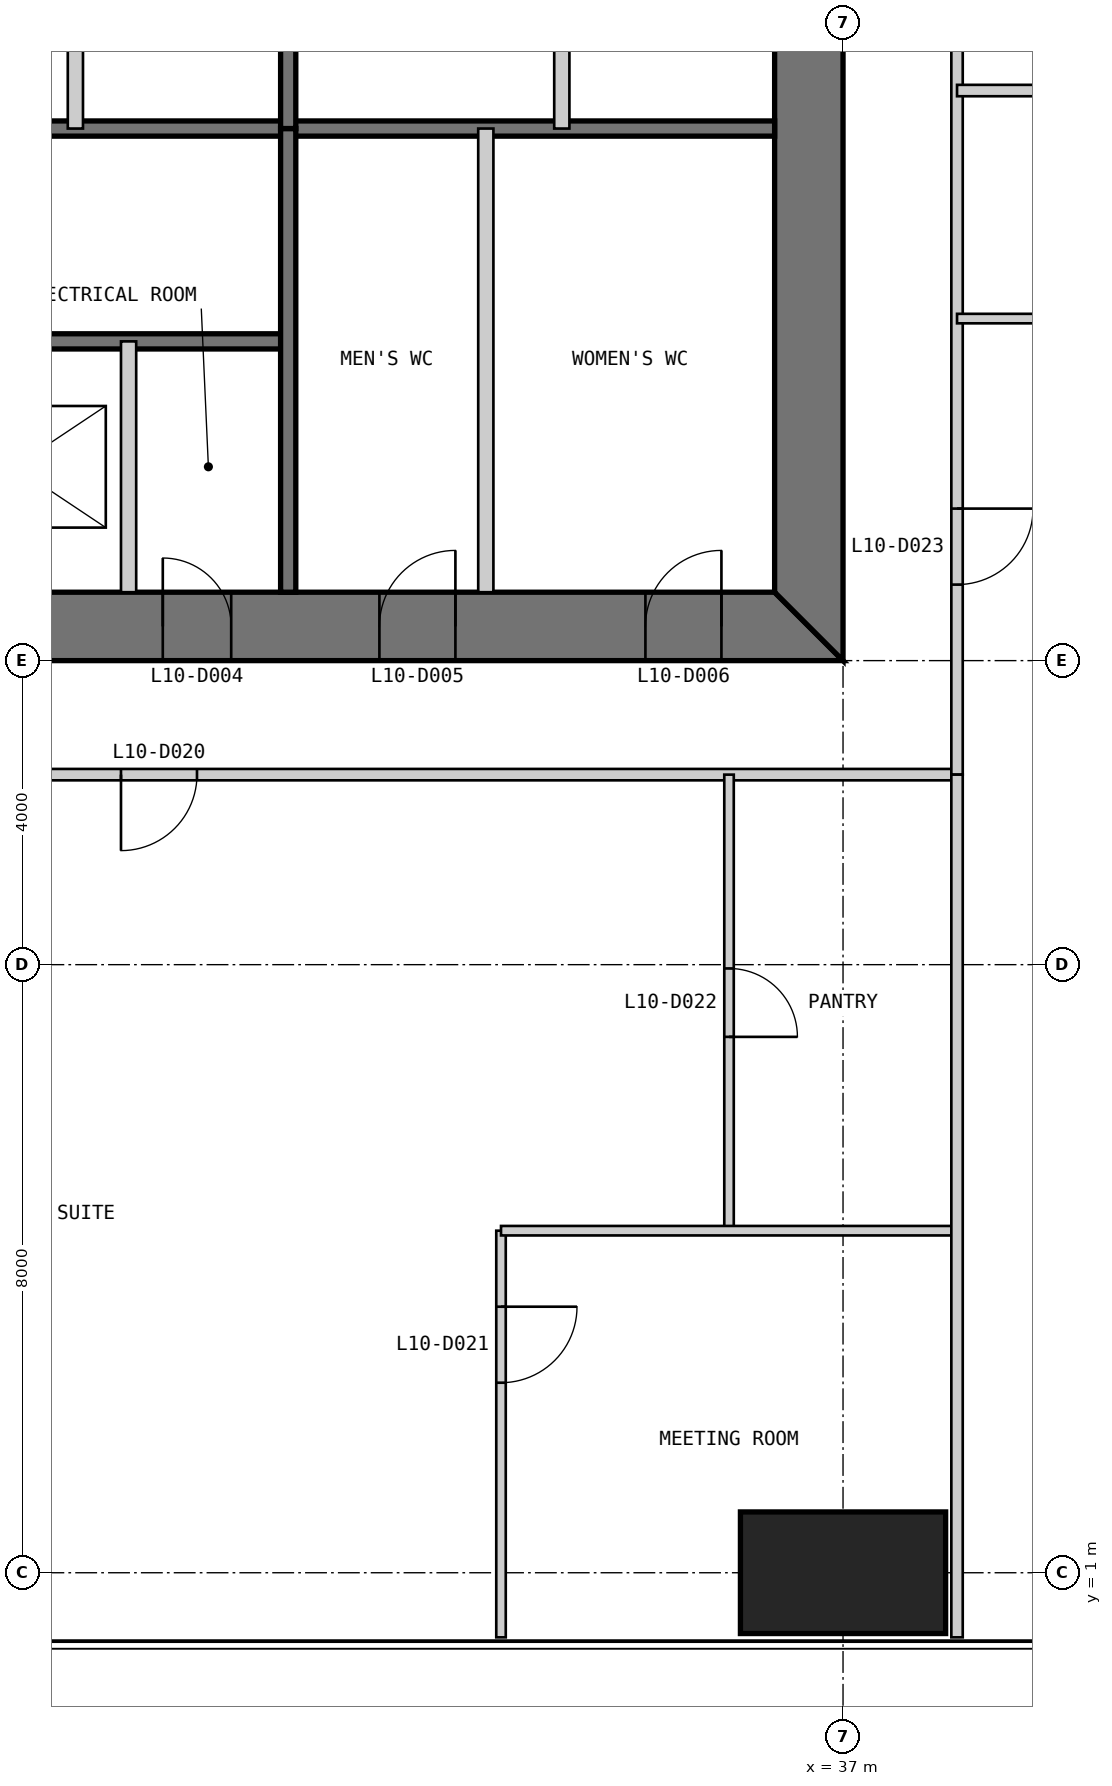
"""IFC4 building model, lengths in metres.
Left out: names, types, materials, properties, quantities, classifications, styles, units other than length and angle.
Written with IfcOpenShell. Run it as: python <this file> out.ifc"""

import sys

from ifc_helpers import new_model, si_unit, direction, frame, frame_2d, origin, origin_2d, place, context, subcontext, project, spatial, polyline, rectangle, outline, extrude, element, fill, save


model = new_model("IFC4")
c1 = context("Model", 3, precision=1e-05, world=origin(), true_north=direction((0.0, 1.0)))
c2 = subcontext(c1, "Body", "Model", "MODEL_VIEW")
j1 = project(units=[si_unit("LENGTHUNIT", "METRE"), si_unit("PLANEANGLEUNIT", "RADIAN")], contexts=[c1])
p1 = place(None, origin())
s1 = spatial("IfcSite", under=j1, at=p1, CompositionType="ELEMENT")
p2 = place(p1, origin())
s2 = spatial("IfcBuilding", under=s1, at=p2, CompositionType="ELEMENT")
p3 = place(p2, frame((0.0, 0.0, 47.0)))
s3 = spatial("IfcBuildingStorey", under=s2, at=p3, CompositionType="ELEMENT", Elevation=47.0)
p4 = place(p3, frame((37.0, 1.0, 0.0), z_axis=(0.0, 0.0, 1.0), x_axis=(1.0, 0.0, 0.0)))
e1 = element("IfcColumn", 1, at=p4, inside=s3, PredefinedType="COLUMN", context=c2, shape_type="SweptSolid", body=[
    extrude(rectangle(XDim=2.7, YDim=1.6, at=origin_2d()), origin(), (0.0, 0.0, 1.0), 4.0),
])
p5 = place(p3, frame((13.0, 13.45, 0.0), z_axis=(0.0, 0.0, 1.0), x_axis=(1.0, 0.0, 0.0)))
e2 = element("IfcWall", 2, at=p5, inside=s3, PredefinedType="SHEAR", context=c2, shape_type="SweptSolid", body=[
    extrude(outline(polyline([(0.0, -0.45), (24.0, -0.45), (23.1, 0.45), (0.9, 0.45), (0.0, -0.45)])), origin(), (0.0, 0.0, 1.0), 4.0),
])
p6 = place(p5, frame((4.9, 0.0, 0.0)))
e3 = element("IfcOpeningElement", 3, at=p6, cuts=e2, PredefinedType="OPENING", context=c2, shape_type="SweptSolid", body=[
    extrude(rectangle(XDim=1.0, YDim=2.2, at=frame_2d((0.5, 1.1))), frame((0.0, 0.46, 0.0), z_axis=(0.0, -1.0, 0.0), x_axis=(1.0, 0.0, 0.0)), (0.0, 0.0, 1.0), 0.92),
])
p7 = place(p5, frame((8.9, 0.0, 0.0)))
e4 = element("IfcOpeningElement", 4, at=p7, cuts=e2, PredefinedType="OPENING", context=c2, shape_type="SweptSolid", body=[
    extrude(rectangle(XDim=1.1, YDim=2.2, at=frame_2d((0.55, 1.1))), frame((0.0, 0.46, 0.0), z_axis=(0.0, -1.0, 0.0), x_axis=(1.0, 0.0, 0.0)), (0.0, 0.0, 1.0), 0.92),
])
p8 = place(p5, frame((15.05, 0.0, 0.0)))
e5 = element("IfcOpeningElement", 5, at=p8, cuts=e2, PredefinedType="OPENING", context=c2, shape_type="SweptSolid", body=[
    extrude(rectangle(XDim=0.9, YDim=2.2, at=frame_2d((0.45, 1.1))), frame((0.0, 0.46, 0.0), z_axis=(0.0, -1.0, 0.0), x_axis=(1.0, 0.0, 0.0)), (0.0, 0.0, 1.0), 0.92),
])
p9 = place(p5, frame((17.9, 0.0, 0.0)))
e6 = element("IfcOpeningElement", 6, at=p9, cuts=e2, PredefinedType="OPENING", context=c2, shape_type="SweptSolid", body=[
    extrude(rectangle(XDim=1.0, YDim=2.2, at=frame_2d((0.5, 1.1))), frame((0.0, 0.46, 0.0), z_axis=(0.0, -1.0, 0.0), x_axis=(1.0, 0.0, 0.0)), (0.0, 0.0, 1.0), 0.92),
])
p10 = place(p5, frame((21.4, 0.0, 0.0)))
e7 = element("IfcOpeningElement", 7, at=p10, cuts=e2, PredefinedType="OPENING", context=c2, shape_type="SweptSolid", body=[
    extrude(rectangle(XDim=1.0, YDim=2.2, at=frame_2d((0.5, 1.1))), frame((0.0, 0.46, 0.0), z_axis=(0.0, -1.0, 0.0), x_axis=(1.0, 0.0, 0.0)), (0.0, 0.0, 1.0), 0.92),
])
p11 = place(p3, frame((36.55, 13.9, 0.0), z_axis=(0.0, 0.0, 1.0), x_axis=(0.0, 1.0, 0.0)))
e8 = element("IfcWall", 8, at=p11, inside=s3, PredefinedType="SHEAR", context=c2, shape_type="SweptSolid", body=[
    extrude(outline(polyline([(-0.9, -0.45), (23.1, -0.45), (22.2, 0.45), (0.0, 0.45), (-0.9, -0.45)])), origin(), (0.0, 0.0, 1.0), 4.0),
])
p12 = place(p11, frame((20.2, 0.0, 0.0)))
e9 = element("IfcOpeningElement", 9, at=p12, cuts=e8, PredefinedType="OPENING", context=c2, shape_type="SweptSolid", body=[
    extrude(rectangle(XDim=1.0, YDim=2.2, at=frame_2d((0.5, 1.1))), frame((0.0, 0.46, 0.0), z_axis=(0.0, -1.0, 0.0), x_axis=(1.0, 0.0, 0.0)), (0.0, 0.0, 1.0), 0.92),
])
p13 = place(p11, frame((17.25, 0.0, 0.0)))
e10 = element("IfcOpeningElement", 10, at=p13, cuts=e8, PredefinedType="OPENING", context=c2, shape_type="SweptSolid", body=[
    extrude(rectangle(XDim=0.9, YDim=2.2, at=frame_2d((0.45, 1.1))), frame((0.0, 0.46, 0.0), z_axis=(0.0, -1.0, 0.0), x_axis=(1.0, 0.0, 0.0)), (0.0, 0.0, 1.0), 0.92),
])
p14 = place(p3, frame((20.3, 17.2, 0.0), z_axis=(0.0, 0.0, 1.0), x_axis=(1.0, 0.0, 0.0)))
e11 = element("IfcWall", 11, at=p14, inside=s3, PredefinedType="SOLIDWALL", context=c2, shape_type="SweptSolid", body=[
    extrude(rectangle(XDim=9.4, YDim=0.2, at=frame_2d((4.7, 0.0))), origin(), (0.0, 0.0, 1.0), 3.8),
])
p15 = place(p14, frame((0.25, 0.0, 0.0)))
e12 = element("IfcOpeningElement", 12, at=p15, cuts=e11, PredefinedType="OPENING", context=c2, shape_type="SweptSolid", body=[
    extrude(rectangle(XDim=1.0, YDim=2.2, at=frame_2d((0.5, 1.1))), frame((0.0, 0.11, 0.0), z_axis=(0.0, -1.0, 0.0), x_axis=(1.0, 0.0, 0.0)), (0.0, 0.0, 1.0), 0.22),
])
p16 = place(p3, frame((20.3, 20.0, 0.0), z_axis=(0.0, 0.0, 1.0), x_axis=(1.0, 0.0, 0.0)))
e13 = element("IfcWall", 13, at=p16, inside=s3, PredefinedType="SOLIDWALL", context=c2, shape_type="SweptSolid", body=[
    extrude(rectangle(XDim=15.8, YDim=0.2, at=frame_2d((7.9, 0.0))), origin(), (0.0, 0.0, 1.0), 3.8),
])
p17 = place(p3, frame((27.6, 13.9, 0.0), z_axis=(0.0, 0.0, 1.0), x_axis=(0.0, 1.0, 0.0)))
e14 = element("IfcWall", 14, at=p17, inside=s3, PredefinedType="PARTITIONING", context=c2, shape_type="SweptSolid", body=[
    extrude(rectangle(XDim=3.3, YDim=0.2, at=frame_2d((1.65, 0.0))), origin(), (0.0, 0.0, 1.0), 3.8),
])
p18 = place(p3, frame((29.7, 13.9, 0.0), z_axis=(0.0, 0.0, 1.0), x_axis=(0.0, 1.0, 0.0)))
e15 = element("IfcWall", 15, at=p18, inside=s3, PredefinedType="SOLIDWALL", context=c2, shape_type="SweptSolid", body=[
    extrude(rectangle(XDim=6.1, YDim=0.2, at=frame_2d((3.05, 0.0))), origin(), (0.0, 0.0, 1.0), 3.8),
])
p19 = place(p3, frame((32.3, 13.9, 0.0), z_axis=(0.0, 0.0, 1.0), x_axis=(0.0, 1.0, 0.0)))
e16 = element("IfcWall", 16, at=p19, inside=s3, PredefinedType="PARTITIONING", context=c2, shape_type="SweptSolid", body=[
    extrude(rectangle(XDim=6.1, YDim=0.2, at=frame_2d((3.05, 0.0))), origin(), (0.0, 0.0, 1.0), 3.8),
])
p20 = place(p3, frame((33.3, 36.1, 0.0), z_axis=(0.0, 0.0, 1.0), x_axis=(0.0, -1.0, 0.0)))
e17 = element("IfcWall", 17, at=p20, inside=s3, PredefinedType="PARTITIONING", context=c2, shape_type="SweptSolid", body=[
    extrude(rectangle(XDim=16.1, YDim=0.2, at=frame_2d((8.05, 0.0))), origin(), (0.0, 0.0, 1.0), 3.8),
])
p21 = place(p3, frame((29.7, 36.1, 0.0), z_axis=(0.0, 0.0, 1.0), x_axis=(0.0, -1.0, 0.0)))
e18 = element("IfcWall", 18, at=p21, inside=s3, PredefinedType="SOLIDWALL", context=c2, shape_type="SweptSolid", body=[
    extrude(rectangle(XDim=16.1, YDim=0.2, at=frame_2d((8.05, 0.0))), origin(), (0.0, 0.0, 1.0), 3.8),
])
p22 = place(p3, frame((26.9, 30.0, 0.0), z_axis=(0.0, 0.0, 1.0), x_axis=(0.0, -1.0, 0.0)))
e19 = element("IfcWall", 19, at=p22, inside=s3, PredefinedType="PARTITIONING", context=c2, shape_type="SweptSolid", body=[
    extrude(rectangle(XDim=10.0, YDim=0.2, at=frame_2d((5.0, 0.0))), origin(), (0.0, 0.0, 1.0), 3.8),
])
p23 = place(p3, frame((11.5, 11.5, 0.0), z_axis=(0.0, 0.0, 1.0), x_axis=(1.0, 0.0, 0.0)))
e20 = element("IfcWall", 20, at=p23, inside=s3, PredefinedType="PARTITIONING", context=c2, shape_type="SweptSolid", body=[
    extrude(rectangle(XDim=27.0, YDim=0.15, at=frame_2d((13.5, 0.0))), origin(), (0.0, 0.0, 1.0), 3.85),
])
p24 = place(p23, frame((2.5, 0.0, 0.0)))
e21 = element("IfcOpeningElement", 21, at=p24, cuts=e20, PredefinedType="OPENING", context=c2, shape_type="SweptSolid", body=[
    extrude(rectangle(XDim=1.0, YDim=2.2, at=frame_2d((0.5, 1.1))), frame((0.0, 0.085, 0.0), z_axis=(0.0, -1.0, 0.0), x_axis=(1.0, 0.0, 0.0)), (0.0, 0.0, 1.0), 0.17),
])
p25 = place(p23, frame((16.0, 0.0, 0.0)))
e22 = element("IfcOpeningElement", 22, at=p25, cuts=e20, PredefinedType="OPENING", context=c2, shape_type="SweptSolid", body=[
    extrude(rectangle(XDim=1.0, YDim=2.2, at=frame_2d((0.5, 1.1))), frame((0.0, 0.085, 0.0), z_axis=(0.0, -1.0, 0.0), x_axis=(1.0, 0.0, 0.0)), (0.0, 0.0, 1.0), 0.17),
])
p26 = place(p3, frame((32.5, 0.15, 0.0), z_axis=(0.0, 0.0, 1.0), x_axis=(0.0, 1.0, 0.0)))
e23 = element("IfcWall", 23, at=p26, inside=s3, PredefinedType="PARTITIONING", context=c2, shape_type="SweptSolid", body=[
    extrude(rectangle(XDim=5.35, YDim=0.125, at=frame_2d((2.675, 0.0))), origin(), (0.0, 0.0, 1.0), 3.85),
])
p27 = place(p26, frame((3.35, 0.0, 0.0)))
e24 = element("IfcOpeningElement", 24, at=p27, cuts=e23, PredefinedType="OPENING", context=c2, shape_type="SweptSolid", body=[
    extrude(rectangle(XDim=1.0, YDim=2.2, at=frame_2d((0.5, 1.1))), frame((0.0, 0.073, 0.0), z_axis=(0.0, -1.0, 0.0), x_axis=(1.0, 0.0, 0.0)), (0.0, 0.0, 1.0), 0.145),
])
p28 = place(p3, frame((35.5, 5.5, 0.0), z_axis=(0.0, 0.0, 1.0), x_axis=(0.0, 1.0, 0.0)))
e25 = element("IfcWall", 25, at=p28, inside=s3, PredefinedType="PARTITIONING", context=c2, shape_type="SweptSolid", body=[
    extrude(rectangle(XDim=6.0, YDim=0.125, at=frame_2d((3.0, 0.0))), origin(), (0.0, 0.0, 1.0), 3.85),
])
p29 = place(p28, frame((2.55, 0.0, 0.0)))
e26 = element("IfcOpeningElement", 26, at=p29, cuts=e25, PredefinedType="OPENING", context=c2, shape_type="SweptSolid", body=[
    extrude(rectangle(XDim=0.9, YDim=2.2, at=frame_2d((0.45, 1.1))), frame((0.0, 0.073, 0.0), z_axis=(0.0, -1.0, 0.0), x_axis=(1.0, 0.0, 0.0)), (0.0, 0.0, 1.0), 0.145),
])
p30 = place(p3, frame((32.5, 5.5, 0.0), z_axis=(0.0, 0.0, 1.0), x_axis=(1.0, 0.0, 0.0)))
e27 = element("IfcWall", 27, at=p30, inside=s3, PredefinedType="PARTITIONING", context=c2, shape_type="SweptSolid", body=[
    extrude(rectangle(XDim=6.0, YDim=0.125, at=frame_2d((3.0, 0.0))), origin(), (0.0, 0.0, 1.0), 3.85),
])
p31 = place(p3, frame((38.5, 11.5, 0.0), z_axis=(0.0, 0.0, 1.0), x_axis=(0.0, 1.0, 0.0)))
e28 = element("IfcWall", 28, at=p31, inside=s3, PredefinedType="PARTITIONING", context=c2, shape_type="SweptSolid", body=[
    extrude(rectangle(XDim=27.0, YDim=0.15, at=frame_2d((13.5, 0.0))), origin(), (0.0, 0.0, 1.0), 3.85),
])
p32 = place(p31, frame((2.5, 0.0, 0.0)))
e29 = element("IfcOpeningElement", 29, at=p32, cuts=e28, PredefinedType="OPENING", context=c2, shape_type="SweptSolid", body=[
    extrude(rectangle(XDim=1.0, YDim=2.2, at=frame_2d((0.5, 1.1))), frame((0.0, 0.085, 0.0), z_axis=(0.0, -1.0, 0.0), x_axis=(1.0, 0.0, 0.0)), (0.0, 0.0, 1.0), 0.17),
])
p33 = place(p31, frame((16.0, 0.0, 0.0)))
e30 = element("IfcOpeningElement", 30, at=p33, cuts=e28, PredefinedType="OPENING", context=c2, shape_type="SweptSolid", body=[
    extrude(rectangle(XDim=1.0, YDim=2.2, at=frame_2d((0.5, 1.1))), frame((0.0, 0.085, 0.0), z_axis=(0.0, -1.0, 0.0), x_axis=(1.0, 0.0, 0.0)), (0.0, 0.0, 1.0), 0.17),
])
p34 = place(p3, frame((38.5, 0.15, 0.0), z_axis=(0.0, 0.0, 1.0), x_axis=(0.0, 1.0, 0.0)))
e31 = element("IfcWall", 31, at=p34, inside=s3, PredefinedType="PARTITIONING", context=c2, shape_type="SweptSolid", body=[
    extrude(rectangle(XDim=11.35, YDim=0.15, at=frame_2d((5.675, 0.0))), origin(), (0.0, 0.0, 1.0), 3.85),
])
p35 = place(p3, frame((44.5, 17.5, 0.0), z_axis=(0.0, 0.0, 1.0), x_axis=(-1.0, 0.0, 0.0)))
e32 = element("IfcWall", 32, at=p35, inside=s3, PredefinedType="PARTITIONING", context=c2, shape_type="SweptSolid", body=[
    extrude(rectangle(XDim=6.0, YDim=0.125, at=frame_2d((3.0, 0.0))), origin(), (0.0, 0.0, 1.0), 3.85),
])
p36 = place(p35, frame((2.55, 0.0, 0.0)))
e33 = element("IfcOpeningElement", 33, at=p36, cuts=e32, PredefinedType="OPENING", context=c2, shape_type="SweptSolid", body=[
    extrude(rectangle(XDim=0.9, YDim=2.2, at=frame_2d((0.45, 1.1))), frame((0.0, 0.073, 0.0), z_axis=(0.0, -1.0, 0.0), x_axis=(1.0, 0.0, 0.0)), (0.0, 0.0, 1.0), 0.145),
])
p37 = place(p3, frame((49.85, 20.5, 0.0), z_axis=(0.0, 0.0, 1.0), x_axis=(-1.0, 0.0, 0.0)))
e34 = element("IfcWall", 34, at=p37, inside=s3, PredefinedType="PARTITIONING", context=c2, shape_type="SweptSolid", body=[
    extrude(rectangle(XDim=11.35, YDim=0.15, at=frame_2d((5.675, 0.0))), origin(), (0.0, 0.0, 1.0), 3.85),
])
p38 = place(p8, origin())
e35 = element("IfcDoor", 35, at=p38, inside=s3, OperationType="SINGLE_SWING_LEFT", PredefinedType="DOOR", context=c2, shape_type="SweptSolid", body=[
    extrude(rectangle(XDim=0.9, YDim=2.2, at=frame_2d((0.45, 1.1))), frame((0.0, 0.025, 0.0), z_axis=(0.0, -1.0, 0.0), x_axis=(1.0, 0.0, 0.0)), (0.0, 0.0, 1.0), 0.05),
    extrude(outline(polyline([(0.0, 0.0), (0.04, 0.0), (0.04, 2.16), (0.86, 2.16), (0.86, 0.0), (0.9, 0.0), (0.9, 2.2), (0.0, 2.2), (0.0, 0.0)])), frame((0.0, 0.3, 0.0), z_axis=(0.0, -1.0, 0.0), x_axis=(1.0, 0.0, 0.0)), (0.0, 0.0, 1.0), 0.6),
])
fill(e5, e35)
p39 = place(p9, origin())
e36 = element("IfcDoor", 36, at=p39, inside=s3, OperationType="SINGLE_SWING_RIGHT", PredefinedType="DOOR", context=c2, shape_type="SweptSolid", body=[
    extrude(rectangle(XDim=1.0, YDim=2.2, at=frame_2d((0.5, 1.1))), frame((0.0, 0.025, 0.0), z_axis=(0.0, -1.0, 0.0), x_axis=(1.0, 0.0, 0.0)), (0.0, 0.0, 1.0), 0.05),
    extrude(outline(polyline([(0.0, 0.0), (0.04, 0.0), (0.04, 2.16), (0.96, 2.16), (0.96, 0.0), (1.0, 0.0), (1.0, 2.2), (0.0, 2.2), (0.0, 0.0)])), frame((0.0, 0.3, 0.0), z_axis=(0.0, -1.0, 0.0), x_axis=(1.0, 0.0, 0.0)), (0.0, 0.0, 1.0), 0.6),
])
fill(e6, e36)
p40 = place(p10, origin())
e37 = element("IfcDoor", 37, at=p40, inside=s3, OperationType="SINGLE_SWING_RIGHT", PredefinedType="DOOR", context=c2, shape_type="SweptSolid", body=[
    extrude(rectangle(XDim=1.0, YDim=2.2, at=frame_2d((0.5, 1.1))), frame((0.0, 0.025, 0.0), z_axis=(0.0, -1.0, 0.0), x_axis=(1.0, 0.0, 0.0)), (0.0, 0.0, 1.0), 0.05),
    extrude(outline(polyline([(0.0, 0.0), (0.04, 0.0), (0.04, 2.16), (0.96, 2.16), (0.96, 0.0), (1.0, 0.0), (1.0, 2.2), (0.0, 2.2), (0.0, 0.0)])), frame((0.0, 0.3, 0.0), z_axis=(0.0, -1.0, 0.0), x_axis=(1.0, 0.0, 0.0)), (0.0, 0.0, 1.0), 0.6),
])
fill(e7, e37)
p41 = place(p25, frame((1.0, 0.0, 0.0), z_axis=(0.0, 0.0, 1.0), x_axis=(-1.0, 0.0, 0.0)))
e38 = element("IfcDoor", 38, at=p41, inside=s3, OperationType="SINGLE_SWING_RIGHT", PredefinedType="DOOR", context=c2, shape_type="SweptSolid", body=[
    extrude(rectangle(XDim=1.0, YDim=2.2, at=frame_2d((0.5, 1.1))), frame((0.0, 0.025, 0.0), z_axis=(0.0, -1.0, 0.0), x_axis=(1.0, 0.0, 0.0)), (0.0, 0.0, 1.0), 0.05),
])
fill(e22, e38)
p42 = place(p27, frame((1.0, 0.0, 0.0), z_axis=(0.0, 0.0, 1.0), x_axis=(-1.0, 0.0, 0.0)))
e39 = element("IfcDoor", 39, at=p42, inside=s3, OperationType="SINGLE_SWING_LEFT", PredefinedType="DOOR", context=c2, shape_type="SweptSolid", body=[
    extrude(rectangle(XDim=1.0, YDim=2.2, at=frame_2d((0.5, 1.1))), frame((0.0, 0.025, 0.0), z_axis=(0.0, -1.0, 0.0), x_axis=(1.0, 0.0, 0.0)), (0.0, 0.0, 1.0), 0.05),
])
fill(e24, e39)
p43 = place(p29, frame((0.9, 0.0, 0.0), z_axis=(0.0, 0.0, 1.0), x_axis=(-1.0, 0.0, 0.0)))
e40 = element("IfcDoor", 40, at=p43, inside=s3, OperationType="SINGLE_SWING_RIGHT", PredefinedType="DOOR", context=c2, shape_type="SweptSolid", body=[
    extrude(rectangle(XDim=0.9, YDim=2.2, at=frame_2d((0.45, 1.1))), frame((0.0, 0.025, 0.0), z_axis=(0.0, -1.0, 0.0), x_axis=(1.0, 0.0, 0.0)), (0.0, 0.0, 1.0), 0.05),
])
fill(e26, e40)
p44 = place(p32, frame((1.0, 0.0, 0.0), z_axis=(0.0, 0.0, 1.0), x_axis=(-1.0, 0.0, 0.0)))
e41 = element("IfcDoor", 41, at=p44, inside=s3, OperationType="SINGLE_SWING_LEFT", PredefinedType="DOOR", context=c2, shape_type="SweptSolid", body=[
    extrude(rectangle(XDim=1.0, YDim=2.2, at=frame_2d((0.5, 1.1))), frame((0.0, 0.025, 0.0), z_axis=(0.0, -1.0, 0.0), x_axis=(1.0, 0.0, 0.0)), (0.0, 0.0, 1.0), 0.05),
])
fill(e29, e41)
save(model, sys.argv[1])
